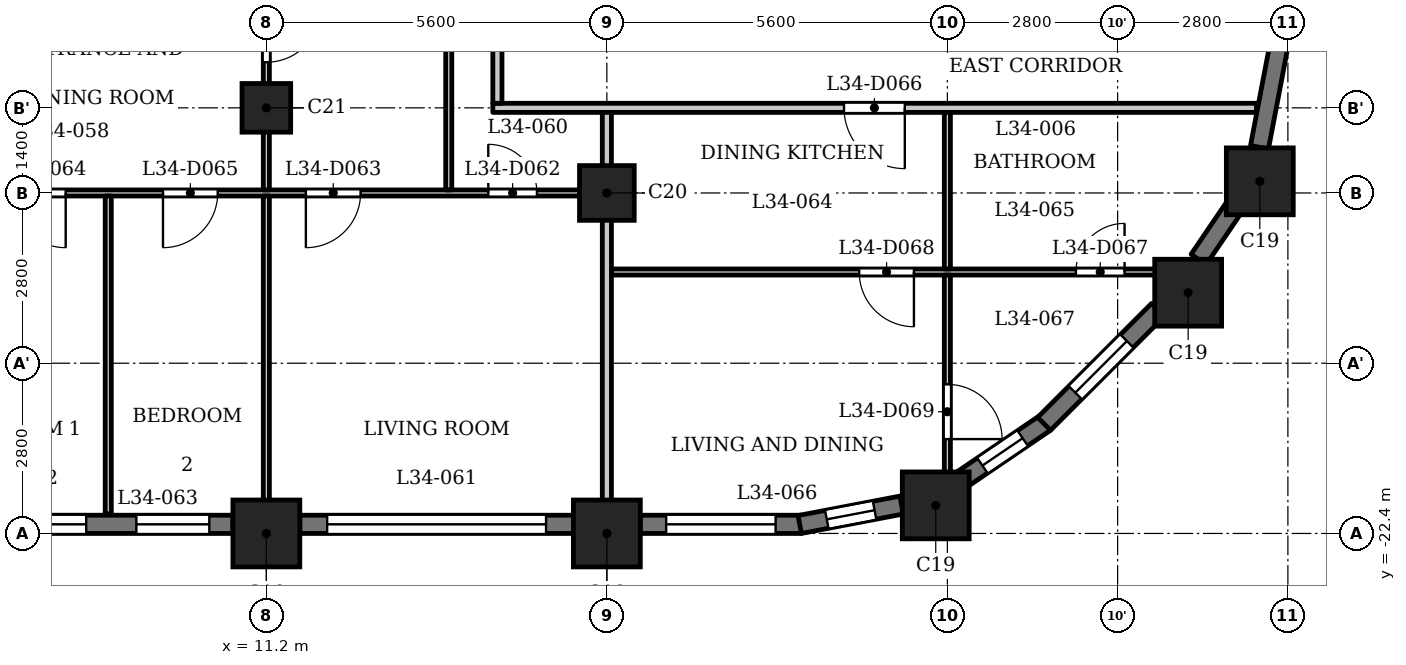
"""IFC4 building model, lengths in metres.
Left out: names, types, materials, properties, quantities, classifications, styles, units other than length and angle.
Written with IfcOpenShell. Run it as: python <this file> out.ifc"""

import sys

from ifc_helpers import new_model, si_unit, direction, frame, frame_2d, origin, origin_2d, place, context, subcontext, project, spatial, rectangle, extrude, element, fill, save


model = new_model("IFC4")
c1 = context("Model", 3, precision=1e-05, world=origin(), true_north=direction((0.0, 1.0)))
c2 = subcontext(c1, "Body", "Model", "MODEL_VIEW")
j1 = project(units=[si_unit("LENGTHUNIT", "METRE"), si_unit("PLANEANGLEUNIT", "RADIAN")], contexts=[c1])
p1 = place(None, origin())
s1 = spatial("IfcSite", under=j1, at=p1, CompositionType="ELEMENT")
p2 = place(p1, origin())
s2 = spatial("IfcBuilding", under=s1, at=p2, CompositionType="ELEMENT")
p3 = place(p2, frame((0.0, 0.0, 136.1)))
s3 = spatial("IfcBuildingStorey", under=s2, at=p3, CompositionType="ELEMENT", Elevation=136.1)
for number, where, z_axis, x_axis in (
    (1, (11.2, -22.4, 0.0), (0.0, 0.0, 1.0), (1.0, 0.0, 0.0)),
    (2, (16.8, -22.4, 0.0), (0.0, 0.0, 1.0), (1.0, 0.0, 0.0)),
    (3, (22.209, -21.938, 0.0), (0.0, 0.0, 1.0), (1.0, 0.0, 0.0)),
    (4, (26.36, -18.44, 0.0), (0.0, 0.0, 1.0), (1.0, 0.0, 0.0)),
    (5, (27.538, -16.609, 0.0), (0.0, 0.0, 1.0), (1.0, 0.0, 0.0)),
):
    element("IfcColumn", number, at=place(p3, frame(where, z_axis=z_axis, x_axis=x_axis)), inside=s3, PredefinedType="COLUMN", context=c2, shape_type="SweptSolid", body=[
        extrude(rectangle(XDim=1.1, YDim=1.1, at=origin_2d()), origin(), (0.0, 0.0, 1.0), 3.5),
    ])
p4 = place(p3, frame((16.8, -16.8, 0.0), z_axis=(0.0, 0.0, 1.0), x_axis=(1.0, 0.0, 0.0)))
e6 = element("IfcColumn", 6, at=p4, inside=s3, PredefinedType="COLUMN", context=c2, shape_type="SweptSolid", body=[
    extrude(rectangle(XDim=0.9, YDim=0.9, at=origin_2d()), origin(), (0.0, 0.0, 1.0), 3.5),
])
p5 = place(p3, frame((11.2, -15.4, 0.0), z_axis=(0.0, 0.0, 1.0), x_axis=(1.0, 0.0, 0.0)))
e7 = element("IfcColumn", 7, at=p5, inside=s3, PredefinedType="COLUMN", context=c2, shape_type="SweptSolid", body=[
    extrude(rectangle(XDim=0.8, YDim=0.8, at=origin_2d()), origin(), (0.0, 0.0, 1.0), 3.5),
])
p6 = place(p3, frame((6.15, -22.25, 0.0), z_axis=(0.0, 0.0, 1.0), x_axis=(1.0, 0.0, 0.0)))
e8 = element("IfcWall", 8, at=p6, inside=s3, PredefinedType="SOLIDWALL", context=c2, shape_type="SweptSolid", body=[
    extrude(rectangle(XDim=4.5, YDim=0.3, at=frame_2d((2.25, 0.0))), origin(), (0.0, 0.0, 1.0), 2.45),
])
p7 = place(p6, frame((0.288, 0.0, 0.9)))
e9 = element("IfcOpeningElement", 9, at=p7, cuts=e8, PredefinedType="OPENING", context=c2, shape_type="SweptSolid", body=[
    extrude(rectangle(XDim=1.8, YDim=1.25, at=frame_2d((0.9, 0.625))), frame((0.0, 0.16, 0.0), z_axis=(0.0, -1.0, 0.0), x_axis=(1.0, 0.0, 0.0)), (0.0, 0.0, 1.0), 0.32),
])
p8 = place(p6, frame((2.913, 0.0, 0.6)))
e10 = element("IfcOpeningElement", 10, at=p8, cuts=e8, PredefinedType="OPENING", context=c2, shape_type="SweptSolid", body=[
    extrude(rectangle(XDim=1.2, YDim=1.55, at=frame_2d((0.6, 0.775))), frame((0.0, 0.16, 0.0), z_axis=(0.0, -1.0, 0.0), x_axis=(1.0, 0.0, 0.0)), (0.0, 0.0, 1.0), 0.32),
])
p9 = place(p3, frame((11.75, -22.25, 0.0), z_axis=(0.0, 0.0, 1.0), x_axis=(1.0, 0.0, 0.0)))
e11 = element("IfcWall", 11, at=p9, inside=s3, PredefinedType="SOLIDWALL", context=c2, shape_type="SweptSolid", body=[
    extrude(rectangle(XDim=4.5, YDim=0.3, at=frame_2d((2.25, 0.0))), origin(), (0.0, 0.0, 1.0), 2.45),
])
p10 = place(p9, frame((0.45, 0.0, 1.2)))
e12 = element("IfcOpeningElement", 12, at=p10, cuts=e11, PredefinedType="OPENING", context=c2, shape_type="SweptSolid", body=[
    extrude(rectangle(XDim=3.6, YDim=0.95, at=frame_2d((1.8, 0.475))), frame((0.0, 0.16, 0.0), z_axis=(0.0, -1.0, 0.0), x_axis=(1.0, 0.0, 0.0)), (0.0, 0.0, 1.0), 0.32),
])
p11 = place(p3, frame((17.35, -22.25, 0.0), z_axis=(0.0, 0.0, 1.0), x_axis=(1.0, 0.0, 0.0)))
e13 = element("IfcWall", 13, at=p11, inside=s3, PredefinedType="SOLIDWALL", context=c2, shape_type="SweptSolid", body=[
    extrude(rectangle(XDim=2.65, YDim=0.3, at=frame_2d((1.325, 0.0))), origin(), (0.0, 0.0, 1.0), 2.45),
])
p12 = place(p11, frame((0.425, 0.0, 0.9)))
e14 = element("IfcOpeningElement", 14, at=p12, cuts=e13, PredefinedType="OPENING", context=c2, shape_type="SweptSolid", body=[
    extrude(rectangle(XDim=1.8, YDim=1.25, at=frame_2d((0.9, 0.625))), frame((0.0, 0.16, 0.0), z_axis=(0.0, -1.0, 0.0), x_axis=(1.0, 0.0, 0.0)), (0.0, 0.0, 1.0), 0.32),
])
p13 = place(p3, frame((19.972, -22.253, 0.0), z_axis=(0.0, 0.0, 1.0), x_axis=(0.982297206936, 0.187329114784, 0.0)))
e15 = element("IfcWall", 15, at=p13, inside=s3, PredefinedType="SOLIDWALL", context=c2, shape_type="SweptSolid", body=[
    extrude(rectangle(XDim=1.706, YDim=0.3, at=frame_2d((0.853, 0.0))), origin(), (0.0, 0.0, 1.0), 2.45),
])
p14 = place(p13, frame((0.453, 0.0, 0.6)))
e16 = element("IfcOpeningElement", 16, at=p14, cuts=e15, PredefinedType="OPENING", context=c2, shape_type="SweptSolid", body=[
    extrude(rectangle(XDim=0.8, YDim=1.55, at=frame_2d((0.4, 0.775))), frame((0.0, 0.16, 0.0), z_axis=(0.0, -1.0, 0.0), x_axis=(1.0, 0.0, 0.0)), (0.0, 0.0, 1.0), 0.32),
])
p15 = place(p3, frame((22.602, -21.538, 0.0), z_axis=(0.0, 0.0, 1.0), x_axis=(0.827040942766, 0.562141689424, 0.0)))
e17 = element("IfcWall", 17, at=p15, inside=s3, PredefinedType="SOLIDWALL", context=c2, shape_type="SweptSolid", body=[
    extrude(rectangle(XDim=1.706, YDim=0.3, at=frame_2d((0.853, 0.0))), origin(), (0.0, 0.0, 1.0), 2.45),
])
p16 = place(p15, frame((0.453, 0.0, 0.6)))
e18 = element("IfcOpeningElement", 18, at=p16, cuts=e17, PredefinedType="OPENING", context=c2, shape_type="SweptSolid", body=[
    extrude(rectangle(XDim=0.8, YDim=1.55, at=frame_2d((0.4, 0.775))), frame((0.0, 0.16, 0.0), z_axis=(0.0, -1.0, 0.0), x_axis=(1.0, 0.0, 0.0)), (0.0, 0.0, 1.0), 0.32),
])
p17 = place(p3, frame((23.991, -20.597, 0.0), z_axis=(0.0, 0.0, 1.0), x_axis=(0.707106781187, 0.707106781187, 0.0)))
e19 = element("IfcWall", 19, at=p17, inside=s3, PredefinedType="SOLIDWALL", context=c2, shape_type="SweptSolid", body=[
    extrude(rectangle(XDim=2.65, YDim=0.3, at=frame_2d((1.325, 0.0))), origin(), (0.0, 0.0, 1.0), 2.45),
])
p18 = place(p17, frame((0.725, 0.0, 0.6)))
e20 = element("IfcOpeningElement", 20, at=p18, cuts=e19, PredefinedType="OPENING", context=c2, shape_type="SweptSolid", body=[
    extrude(rectangle(XDim=1.2, YDim=1.55, at=frame_2d((0.6, 0.775))), frame((0.0, 0.16, 0.0), z_axis=(0.0, -1.0, 0.0), x_axis=(1.0, 0.0, 0.0)), (0.0, 0.0, 1.0), 0.32),
])
p19 = place(p3, frame((26.532, -17.893, 0.0), z_axis=(0.0, 0.0, 1.0), x_axis=(0.562105419172, 0.82706559458, 0.0)))
e21 = element("IfcWall", 21, at=p19, inside=s3, PredefinedType="SOLIDWALL", context=c2, shape_type="SweptSolid", body=[
    extrude(rectangle(XDim=1.077, YDim=0.3, at=frame_2d((0.539, 0.0))), origin(), (0.0, 0.0, 1.0), 3.2),
])
p20 = place(p3, frame((27.533, -16.048, 0.0), z_axis=(0.0, 0.0, 1.0), x_axis=(0.187302784601, 0.982302227871, 0.0)))
e22 = element("IfcWall", 22, at=p20, inside=s3, PredefinedType="SOLIDWALL", context=c2, shape_type="SweptSolid", body=[
    extrude(rectangle(XDim=1.706, YDim=0.3, at=frame_2d((0.853, 0.0))), origin(), (0.0, 0.0, 1.0), 2.45),
])
p21 = place(p3, frame((16.875, -18.1, 0.0), z_axis=(0.0, 0.0, 1.0), x_axis=(1.0, 0.0, 0.0)))
e23 = element("IfcWall", 23, at=p21, inside=s3, PredefinedType="PARTITIONING", context=c2, shape_type="SweptSolid", body=[
    extrude(rectangle(XDim=9.565, YDim=0.1, at=frame_2d((4.782, 0.0))), origin(), (0.0, 0.0, 1.0), 3.2),
])
p22 = place(p21, frame((7.639, 0.0, 0.0)))
e24 = element("IfcOpeningElement", 24, at=p22, cuts=e23, PredefinedType="OPENING", context=c2, shape_type="SweptSolid", body=[
    extrude(rectangle(XDim=0.8, YDim=2.1, at=frame_2d((0.4, 1.05))), frame((0.0, 0.06, 0.0), z_axis=(0.0, -1.0, 0.0), x_axis=(1.0, 0.0, 0.0)), (0.0, 0.0, 1.0), 0.12),
])
p23 = place(p21, frame((4.075, 0.0, 0.0)))
e25 = element("IfcOpeningElement", 25, at=p23, cuts=e23, PredefinedType="OPENING", context=c2, shape_type="SweptSolid", body=[
    extrude(rectangle(XDim=0.9, YDim=2.1, at=frame_2d((0.45, 1.05))), frame((0.0, 0.06, 0.0), z_axis=(0.0, -1.0, 0.0), x_axis=(1.0, 0.0, 0.0)), (0.0, 0.0, 1.0), 0.12),
])
p24 = place(p3, frame((-16.725, -16.8, 0.0), z_axis=(0.0, 0.0, 1.0), x_axis=(1.0, 0.0, 0.0)))
e26 = element("IfcWall", 26, at=p24, inside=s3, PredefinedType="PARTITIONING", context=c2, shape_type="SweptSolid", body=[
    extrude(rectangle(XDim=33.45, YDim=0.1, at=frame_2d((16.725, 0.0))), origin(), (0.0, 0.0, 1.0), 3.2),
])
p25 = place(p24, frame((0.575, 0.0, 0.0)))
e27 = element("IfcOpeningElement", 27, at=p25, cuts=e26, PredefinedType="OPENING", context=c2, shape_type="SweptSolid", body=[
    extrude(rectangle(XDim=0.8, YDim=2.1, at=frame_2d((0.4, 1.05))), frame((0.0, 0.06, 0.0), z_axis=(0.0, -1.0, 0.0), x_axis=(1.0, 0.0, 0.0)), (0.0, 0.0, 1.0), 0.12),
])
p26 = place(p24, frame((6.175, 0.0, 0.0)))
e28 = element("IfcOpeningElement", 28, at=p26, cuts=e26, PredefinedType="OPENING", context=c2, shape_type="SweptSolid", body=[
    extrude(rectangle(XDim=0.9, YDim=2.1, at=frame_2d((0.45, 1.05))), frame((0.0, 0.06, 0.0), z_axis=(0.0, -1.0, 0.0), x_axis=(1.0, 0.0, 0.0)), (0.0, 0.0, 1.0), 0.12),
])
p27 = place(p24, frame((15.275, 0.0, 0.0)))
e29 = element("IfcOpeningElement", 29, at=p27, cuts=e26, PredefinedType="OPENING", context=c2, shape_type="SweptSolid", body=[
    extrude(rectangle(XDim=0.8, YDim=2.1, at=frame_2d((0.4, 1.05))), frame((0.0, 0.06, 0.0), z_axis=(0.0, -1.0, 0.0), x_axis=(1.0, 0.0, 0.0)), (0.0, 0.0, 1.0), 0.12),
])
p28 = place(p24, frame((11.775, 0.0, 0.0)))
e30 = element("IfcOpeningElement", 30, at=p28, cuts=e26, PredefinedType="OPENING", context=c2, shape_type="SweptSolid", body=[
    extrude(rectangle(XDim=0.9, YDim=2.1, at=frame_2d((0.45, 1.05))), frame((0.0, 0.06, 0.0), z_axis=(0.0, -1.0, 0.0), x_axis=(1.0, 0.0, 0.0)), (0.0, 0.0, 1.0), 0.12),
])
p29 = place(p24, frame((17.275, 0.0, 0.0)))
e31 = element("IfcOpeningElement", 31, at=p29, cuts=e26, PredefinedType="OPENING", context=c2, shape_type="SweptSolid", body=[
    extrude(rectangle(XDim=0.8, YDim=2.1, at=frame_2d((0.4, 1.05))), frame((0.0, 0.06, 0.0), z_axis=(0.0, -1.0, 0.0), x_axis=(1.0, 0.0, 0.0)), (0.0, 0.0, 1.0), 0.12),
])
p30 = place(p24, frame((20.775, 0.0, 0.0)))
e32 = element("IfcOpeningElement", 32, at=p30, cuts=e26, PredefinedType="OPENING", context=c2, shape_type="SweptSolid", body=[
    extrude(rectangle(XDim=0.9, YDim=2.1, at=frame_2d((0.45, 1.05))), frame((0.0, 0.06, 0.0), z_axis=(0.0, -1.0, 0.0), x_axis=(1.0, 0.0, 0.0)), (0.0, 0.0, 1.0), 0.12),
])
p31 = place(p24, frame((31.575, 0.0, 0.0)))
e33 = element("IfcOpeningElement", 33, at=p31, cuts=e26, PredefinedType="OPENING", context=c2, shape_type="SweptSolid", body=[
    extrude(rectangle(XDim=0.8, YDim=2.1, at=frame_2d((0.4, 1.05))), frame((0.0, 0.06, 0.0), z_axis=(0.0, -1.0, 0.0), x_axis=(1.0, 0.0, 0.0)), (0.0, 0.0, 1.0), 0.12),
])
p32 = place(p24, frame((28.575, 0.0, 0.0)))
e34 = element("IfcOpeningElement", 34, at=p32, cuts=e26, PredefinedType="OPENING", context=c2, shape_type="SweptSolid", body=[
    extrude(rectangle(XDim=0.9, YDim=2.1, at=frame_2d((0.45, 1.05))), frame((0.0, 0.06, 0.0), z_axis=(0.0, -1.0, 0.0), x_axis=(1.0, 0.0, 0.0)), (0.0, 0.0, 1.0), 0.12),
])
p33 = place(p24, frame((23.725, 0.0, 0.0)))
e35 = element("IfcOpeningElement", 35, at=p33, cuts=e26, PredefinedType="OPENING", context=c2, shape_type="SweptSolid", body=[
    extrude(rectangle(XDim=0.9, YDim=2.1, at=frame_2d((0.45, 1.05))), frame((0.0, 0.06, 0.0), z_axis=(0.0, -1.0, 0.0), x_axis=(1.0, 0.0, 0.0)), (0.0, 0.0, 1.0), 0.12),
])
p34 = place(p24, frame((26.225, 0.0, 0.0)))
e36 = element("IfcOpeningElement", 36, at=p34, cuts=e26, PredefinedType="OPENING", context=c2, shape_type="SweptSolid", body=[
    extrude(rectangle(XDim=0.9, YDim=2.1, at=frame_2d((0.45, 1.05))), frame((0.0, 0.06, 0.0), z_axis=(0.0, -1.0, 0.0), x_axis=(1.0, 0.0, 0.0)), (0.0, 0.0, 1.0), 0.12),
])
p35 = place(p3, frame((14.925, -15.4, 0.0), z_axis=(0.0, 0.0, 1.0), x_axis=(1.0, 0.0, 0.0)))
e37 = element("IfcWall", 37, at=p35, inside=s3, PredefinedType="PARTITIONING", context=c2, shape_type="SweptSolid", body=[
    extrude(rectangle(XDim=12.559, YDim=0.15, at=frame_2d((6.279, 0.0))), origin(), (0.0, 0.0, 1.0), 3.2),
])
p36 = place(p35, frame((5.775, 0.0, 0.0)))
e38 = element("IfcOpeningElement", 38, at=p36, cuts=e37, PredefinedType="OPENING", context=c2, shape_type="SweptSolid", body=[
    extrude(rectangle(XDim=1.0, YDim=2.1, at=frame_2d((0.5, 1.05))), frame((0.0, 0.085, 0.0), z_axis=(0.0, -1.0, 0.0), x_axis=(1.0, 0.0, 0.0)), (0.0, 0.0, 1.0), 0.17),
])
p37 = place(p3, frame((8.6, -22.08, 0.0), z_axis=(0.0, 0.0, 1.0), x_axis=(0.0, 1.0, 0.0)))
e39 = element("IfcWall", 39, at=p37, inside=s3, PredefinedType="PARTITIONING", context=c2, shape_type="SweptSolid", body=[
    extrude(rectangle(XDim=5.23, YDim=0.1, at=frame_2d((2.615, 0.0))), origin(), (0.0, 0.0, 1.0), 3.2),
])
p38 = place(p3, frame((11.2, -22.93, 0.0), z_axis=(0.0, 0.0, 1.0), x_axis=(0.0, 1.0, 0.0)))
e40 = element("IfcWall", 40, at=p38, inside=s3, PredefinedType="PARTITIONING", context=c2, shape_type="SweptSolid", body=[
    extrude(rectangle(XDim=6.08, YDim=0.1, at=frame_2d((3.04, 0.0))), origin(), (0.0, 0.0, 1.0), 3.2),
])
p39 = place(p3, frame((11.2, -16.75, 0.0), z_axis=(0.0, 0.0, 1.0), x_axis=(0.0, 1.0, 0.0)))
e41 = element("IfcWall", 41, at=p39, inside=s3, PredefinedType="PARTITIONING", context=c2, shape_type="SweptSolid", body=[
    extrude(rectangle(XDim=3.475, YDim=0.1, at=frame_2d((1.738, 0.0))), origin(), (0.0, 0.0, 1.0), 3.2),
])
p40 = place(p39, frame((2.1, 0.0, 0.0)))
e42 = element("IfcOpeningElement", 42, at=p40, cuts=e41, PredefinedType="OPENING", context=c2, shape_type="SweptSolid", body=[
    extrude(rectangle(XDim=0.9, YDim=2.1, at=frame_2d((0.45, 1.05))), frame((0.0, 0.06, 0.0), z_axis=(0.0, -1.0, 0.0), x_axis=(1.0, 0.0, 0.0)), (0.0, 0.0, 1.0), 0.12),
])
p41 = place(p3, frame((14.2, -16.75, 0.0), z_axis=(0.0, 0.0, 1.0), x_axis=(0.0, 1.0, 0.0)))
e43 = element("IfcWall", 43, at=p41, inside=s3, PredefinedType="PARTITIONING", context=c2, shape_type="SweptSolid", body=[
    extrude(rectangle(XDim=3.475, YDim=0.1, at=frame_2d((1.738, 0.0))), origin(), (0.0, 0.0, 1.0), 3.2),
])
p42 = place(p3, frame((15.0, -15.325, 0.0), z_axis=(0.0, 0.0, 1.0), x_axis=(0.0, 1.0, 0.0)))
e44 = element("IfcWall", 44, at=p42, inside=s3, PredefinedType="PARTITIONING", context=c2, shape_type="SweptSolid", body=[
    extrude(rectangle(XDim=2.05, YDim=0.15, at=frame_2d((1.025, 0.0))), origin(), (0.0, 0.0, 1.0), 3.2),
])
p43 = place(p3, frame((16.8, -22.93, 0.0), z_axis=(0.0, 0.0, 1.0), x_axis=(0.0, 1.0, 0.0)))
e45 = element("IfcWall", 45, at=p43, inside=s3, PredefinedType="PARTITIONING", context=c2, shape_type="SweptSolid", body=[
    extrude(rectangle(XDim=7.455, YDim=0.15, at=frame_2d((3.728, 0.0))), origin(), (0.0, 0.0, 1.0), 3.2),
])
p44 = place(p3, frame((22.4, -21.72, 0.0), z_axis=(0.0, 0.0, 1.0), x_axis=(0.0, 1.0, 0.0)))
e46 = element("IfcWall", 46, at=p44, inside=s3, PredefinedType="PARTITIONING", context=c2, shape_type="SweptSolid", body=[
    extrude(rectangle(XDim=3.57, YDim=0.1, at=frame_2d((1.785, 0.0))), origin(), (0.0, 0.0, 1.0), 3.2),
])
p45 = place(p44, frame((0.872, 0.0, 0.0)))
e47 = element("IfcOpeningElement", 47, at=p45, cuts=e46, PredefinedType="OPENING", context=c2, shape_type="SweptSolid", body=[
    extrude(rectangle(XDim=0.9, YDim=2.1, at=frame_2d((0.45, 1.05))), frame((0.0, 0.06, 0.0), z_axis=(0.0, -1.0, 0.0), x_axis=(1.0, 0.0, 0.0)), (0.0, 0.0, 1.0), 0.12),
])
p46 = place(p3, frame((22.4, -18.05, 0.0), z_axis=(0.0, 0.0, 1.0), x_axis=(0.0, 1.0, 0.0)))
e48 = element("IfcWall", 48, at=p46, inside=s3, PredefinedType="PARTITIONING", context=c2, shape_type="SweptSolid", body=[
    extrude(rectangle(XDim=2.575, YDim=0.1, at=frame_2d((1.288, 0.0))), origin(), (0.0, 0.0, 1.0), 3.2),
])
p47 = place(p40, origin())
e49 = element("IfcDoor", 49, at=p47, inside=s3, OperationType="SINGLE_SWING_RIGHT", PredefinedType="DOOR", context=c2, shape_type="SweptSolid", body=[
    extrude(rectangle(XDim=0.9, YDim=2.1, at=frame_2d((0.45, 1.05))), frame((0.0, 0.025, 0.0), z_axis=(0.0, -1.0, 0.0), x_axis=(1.0, 0.0, 0.0)), (0.0, 0.0, 1.0), 0.05),
])
fill(e42, e49)
p48 = place(p31, origin())
e50 = element("IfcDoor", 50, at=p48, inside=s3, OperationType="SINGLE_SWING_RIGHT", PredefinedType="DOOR", context=c2, shape_type="SweptSolid", body=[
    extrude(rectangle(XDim=0.8, YDim=2.1, at=frame_2d((0.4, 1.05))), frame((0.0, 0.025, 0.0), z_axis=(0.0, -1.0, 0.0), x_axis=(1.0, 0.0, 0.0)), (0.0, 0.0, 1.0), 0.05),
])
fill(e33, e50)
p49 = place(p32, origin())
e51 = element("IfcDoor", 51, at=p49, inside=s3, OperationType="SINGLE_SWING_LEFT", PredefinedType="DOOR", context=c2, shape_type="SweptSolid", body=[
    extrude(rectangle(XDim=0.9, YDim=2.1, at=frame_2d((0.45, 1.05))), frame((0.0, 0.025, 0.0), z_axis=(0.0, -1.0, 0.0), x_axis=(1.0, 0.0, 0.0)), (0.0, 0.0, 1.0), 0.05),
])
fill(e34, e51)
p50 = place(p33, origin())
e52 = element("IfcDoor", 52, at=p50, inside=s3, OperationType="SINGLE_SWING_RIGHT", PredefinedType="DOOR", context=c2, shape_type="SweptSolid", body=[
    extrude(rectangle(XDim=0.9, YDim=2.1, at=frame_2d((0.45, 1.05))), frame((0.0, 0.025, 0.0), z_axis=(0.0, -1.0, 0.0), x_axis=(1.0, 0.0, 0.0)), (0.0, 0.0, 1.0), 0.05),
])
fill(e35, e52)
p51 = place(p34, origin())
e53 = element("IfcDoor", 53, at=p51, inside=s3, OperationType="SINGLE_SWING_LEFT", PredefinedType="DOOR", context=c2, shape_type="SweptSolid", body=[
    extrude(rectangle(XDim=0.9, YDim=2.1, at=frame_2d((0.45, 1.05))), frame((0.0, 0.025, 0.0), z_axis=(0.0, -1.0, 0.0), x_axis=(1.0, 0.0, 0.0)), (0.0, 0.0, 1.0), 0.05),
])
fill(e36, e53)
p52 = place(p36, origin())
e54 = element("IfcDoor", 54, at=p52, inside=s3, OperationType="SINGLE_SWING_RIGHT", PredefinedType="DOOR", context=c2, shape_type="SweptSolid", body=[
    extrude(rectangle(XDim=1.0, YDim=2.1, at=frame_2d((0.5, 1.05))), frame((0.0, 0.025, 0.0), z_axis=(0.0, -1.0, 0.0), x_axis=(1.0, 0.0, 0.0)), (0.0, 0.0, 1.0), 0.05),
])
fill(e38, e54)
p53 = place(p22, origin())
e55 = element("IfcDoor", 55, at=p53, inside=s3, OperationType="SINGLE_SWING_LEFT", PredefinedType="DOOR", context=c2, shape_type="SweptSolid", body=[
    extrude(rectangle(XDim=0.8, YDim=2.1, at=frame_2d((0.4, 1.05))), frame((0.0, 0.025, 0.0), z_axis=(0.0, -1.0, 0.0), x_axis=(1.0, 0.0, 0.0)), (0.0, 0.0, 1.0), 0.05),
])
fill(e24, e55)
p54 = place(p23, origin())
e56 = element("IfcDoor", 56, at=p54, inside=s3, OperationType="SINGLE_SWING_RIGHT", PredefinedType="DOOR", context=c2, shape_type="SweptSolid", body=[
    extrude(rectangle(XDim=0.9, YDim=2.1, at=frame_2d((0.45, 1.05))), frame((0.0, 0.025, 0.0), z_axis=(0.0, -1.0, 0.0), x_axis=(1.0, 0.0, 0.0)), (0.0, 0.0, 1.0), 0.05),
])
fill(e25, e56)
p55 = place(p45, origin())
e57 = element("IfcDoor", 57, at=p55, inside=s3, OperationType="SINGLE_SWING_LEFT", PredefinedType="DOOR", context=c2, shape_type="SweptSolid", body=[
    extrude(rectangle(XDim=0.9, YDim=2.1, at=frame_2d((0.45, 1.05))), frame((0.0, 0.025, 0.0), z_axis=(0.0, -1.0, 0.0), x_axis=(1.0, 0.0, 0.0)), (0.0, 0.0, 1.0), 0.05),
])
fill(e47, e57)
p56 = place(p7, origin())
e58 = element("IfcWindow", 58, at=p56, inside=s3, PartitioningType="SINGLE_PANEL", PredefinedType="WINDOW", context=c2, shape_type="SweptSolid", body=[
    extrude(rectangle(XDim=1.8, YDim=1.25, at=frame_2d((0.9, 0.625))), frame((0.0, 0.03, 0.0), z_axis=(0.0, -1.0, 0.0), x_axis=(1.0, 0.0, 0.0)), (0.0, 0.0, 1.0), 0.06),
])
fill(e9, e58)
p57 = place(p8, origin())
e59 = element("IfcWindow", 59, at=p57, inside=s3, PartitioningType="SINGLE_PANEL", PredefinedType="WINDOW", context=c2, shape_type="SweptSolid", body=[
    extrude(rectangle(XDim=1.2, YDim=1.55, at=frame_2d((0.6, 0.775))), frame((0.0, 0.03, 0.0), z_axis=(0.0, -1.0, 0.0), x_axis=(1.0, 0.0, 0.0)), (0.0, 0.0, 1.0), 0.06),
])
fill(e10, e59)
p58 = place(p10, origin())
e60 = element("IfcWindow", 60, at=p58, inside=s3, PartitioningType="SINGLE_PANEL", PredefinedType="WINDOW", context=c2, shape_type="SweptSolid", body=[
    extrude(rectangle(XDim=3.6, YDim=0.95, at=frame_2d((1.8, 0.475))), frame((0.0, 0.03, 0.0), z_axis=(0.0, -1.0, 0.0), x_axis=(1.0, 0.0, 0.0)), (0.0, 0.0, 1.0), 0.06),
])
fill(e12, e60)
p59 = place(p12, origin())
e61 = element("IfcWindow", 61, at=p59, inside=s3, PartitioningType="SINGLE_PANEL", PredefinedType="WINDOW", context=c2, shape_type="SweptSolid", body=[
    extrude(rectangle(XDim=1.8, YDim=1.25, at=frame_2d((0.9, 0.625))), frame((0.0, 0.03, 0.0), z_axis=(0.0, -1.0, 0.0), x_axis=(1.0, 0.0, 0.0)), (0.0, 0.0, 1.0), 0.06),
])
fill(e14, e61)
p60 = place(p14, origin())
e62 = element("IfcWindow", 62, at=p60, inside=s3, PartitioningType="SINGLE_PANEL", PredefinedType="WINDOW", context=c2, shape_type="SweptSolid", body=[
    extrude(rectangle(XDim=0.8, YDim=1.55, at=frame_2d((0.4, 0.775))), frame((0.0, 0.03, 0.0), z_axis=(0.0, -1.0, 0.0), x_axis=(1.0, 0.0, 0.0)), (0.0, 0.0, 1.0), 0.06),
])
fill(e16, e62)
p61 = place(p16, origin())
e63 = element("IfcWindow", 63, at=p61, inside=s3, PartitioningType="SINGLE_PANEL", PredefinedType="WINDOW", context=c2, shape_type="SweptSolid", body=[
    extrude(rectangle(XDim=0.8, YDim=1.55, at=frame_2d((0.4, 0.775))), frame((0.0, 0.03, 0.0), z_axis=(0.0, -1.0, 0.0), x_axis=(1.0, 0.0, 0.0)), (0.0, 0.0, 1.0), 0.06),
])
fill(e18, e63)
p62 = place(p18, origin())
e64 = element("IfcWindow", 64, at=p62, inside=s3, PartitioningType="SINGLE_PANEL", PredefinedType="WINDOW", context=c2, shape_type="SweptSolid", body=[
    extrude(rectangle(XDim=1.2, YDim=1.55, at=frame_2d((0.6, 0.775))), frame((0.0, 0.03, 0.0), z_axis=(0.0, -1.0, 0.0), x_axis=(1.0, 0.0, 0.0)), (0.0, 0.0, 1.0), 0.06),
])
fill(e20, e64)
save(model, sys.argv[1])
